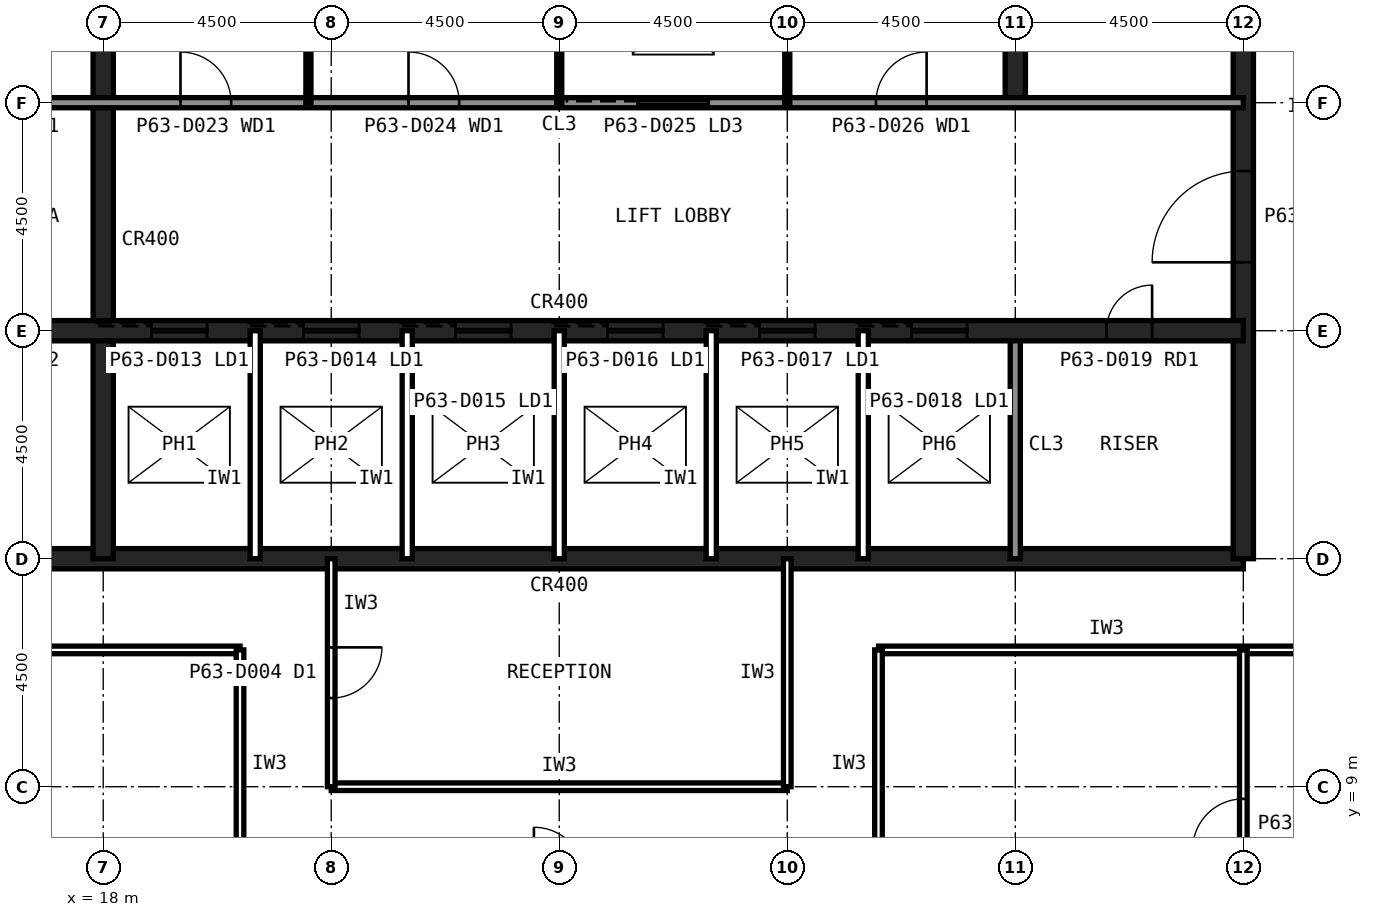
"""IFC4 building model, lengths in metres.
Left out: names, types, materials, properties, quantities, classifications, styles, units other than length and angle.
Written with IfcOpenShell. Run it as: python <this file> out.ifc"""

import sys

from ifc_helpers import new_model, si_unit, direction, frame, frame_2d, origin, place, context, subcontext, project, spatial, rectangle, extrude, element, fill, save


model = new_model("IFC4")
c1 = context("Model", 3, precision=1e-05, world=origin(), true_north=direction((0.0, 1.0)))
c2 = subcontext(c1, "Body", "Model", "MODEL_VIEW")
j1 = project(units=[si_unit("LENGTHUNIT", "METRE"), si_unit("PLANEANGLEUNIT", "RADIAN")], contexts=[c1])
p1 = place(None, origin())
s1 = spatial("IfcSite", under=j1, at=p1, CompositionType="ELEMENT")
p2 = place(p1, origin())
s2 = spatial("IfcBuilding", under=s1, at=p2, CompositionType="ELEMENT")
p3 = place(p2, frame((0.0, 0.0, 262.6)))
s3 = spatial("IfcBuildingStorey", under=s2, at=p3, CompositionType="ELEMENT", Elevation=262.6)
p4 = place(p3, frame((13.5, 13.5, 0.0), z_axis=(0.0, 0.0, 1.0), x_axis=(1.0, 0.0, 0.0)))
e1 = element("IfcWall", 1, at=p4, inside=s3, PredefinedType="SHEAR", context=c2, shape_type="SweptSolid", body=[
    extrude(rectangle(XDim=27.0, YDim=0.4, at=frame_2d((13.5, 0.0))), origin(), (0.0, 0.0, 1.0), 4.0),
])
p5 = place(p3, frame((40.5, 13.5, 0.0), z_axis=(0.0, 0.0, 1.0), x_axis=(0.0, 1.0, 0.0)))
e2 = element("IfcWall", 2, at=p5, inside=s3, PredefinedType="SHEAR", context=c2, shape_type="SweptSolid", body=[
    extrude(rectangle(XDim=27.0, YDim=0.4, at=frame_2d((13.5, 0.0))), origin(), (0.0, 0.0, 1.0), 4.0),
])
p6 = place(p5, frame((5.85, 0.0, 0.0)))
e3 = element("IfcOpeningElement", 3, at=p6, cuts=e2, PredefinedType="OPENING", context=c2, shape_type="SweptSolid", body=[
    extrude(rectangle(XDim=1.8, YDim=2.1, at=frame_2d((0.9, 1.05))), frame((0.0, 0.21, 0.0), z_axis=(0.0, -1.0, 0.0), x_axis=(1.0, 0.0, 0.0)), (0.0, 0.0, 1.0), 0.42),
])
p7 = place(p5, frame((19.65, 0.0, 0.0)))
e4 = element("IfcOpeningElement", 4, at=p7, cuts=e2, PredefinedType="OPENING", context=c2, shape_type="SweptSolid", body=[
    extrude(rectangle(XDim=1.2, YDim=2.1, at=frame_2d((0.6, 1.05))), frame((0.0, 0.21, 0.0), z_axis=(0.0, -1.0, 0.0), x_axis=(1.0, 0.0, 0.0)), (0.0, 0.0, 1.0), 0.42),
])
p8 = place(p3, frame((18.0, 13.5, 0.0), z_axis=(0.0, 0.0, 1.0), x_axis=(0.0, 1.0, 0.0)))
e5 = element("IfcWall", 5, at=p8, inside=s3, PredefinedType="SHEAR", context=c2, shape_type="SweptSolid", body=[
    extrude(rectangle(XDim=18.0, YDim=0.4, at=frame_2d((9.0, 0.0))), origin(), (0.0, 0.0, 1.0), 4.0),
])
p9 = place(p3, frame((36.0, 13.5, 0.0), z_axis=(0.0, 0.0, 1.0), x_axis=(0.0, 1.0, 0.0)))
e6 = element("IfcWall", 6, at=p9, inside=s3, PredefinedType="SOLIDWALL", context=c2, shape_type="SweptSolid", body=[
    extrude(rectangle(XDim=4.5, YDim=0.2, at=frame_2d((2.25, 0.0))), origin(), (0.0, 0.0, 1.0), 3.84),
])
p10 = place(p3, frame((36.0, 22.5, 0.0), z_axis=(0.0, 0.0, 1.0), x_axis=(0.0, 1.0, 0.0)))
e7 = element("IfcWall", 7, at=p10, inside=s3, PredefinedType="SHEAR", context=c2, shape_type="SweptSolid", body=[
    extrude(rectangle(XDim=18.0, YDim=0.4, at=frame_2d((9.0, 0.0))), origin(), (0.0, 0.0, 1.0), 4.0),
])
p11 = place(p3, frame((13.5, 18.0, 0.0), z_axis=(0.0, 0.0, 1.0), x_axis=(1.0, 0.0, 0.0)))
e8 = element("IfcWall", 8, at=p11, inside=s3, PredefinedType="SHEAR", context=c2, shape_type="SweptSolid", body=[
    extrude(rectangle(XDim=27.0, YDim=0.4, at=frame_2d((13.5, 0.0))), origin(), (0.0, 0.0, 1.0), 4.0),
])
p12 = place(p11, frame((24.3, 0.0, 0.0)))
e9 = element("IfcOpeningElement", 9, at=p12, cuts=e8, PredefinedType="OPENING", context=c2, shape_type="SweptSolid", body=[
    extrude(rectangle(XDim=0.9, YDim=2.1, at=frame_2d((0.45, 1.05))), frame((0.0, 0.21, 0.0), z_axis=(0.0, -1.0, 0.0), x_axis=(1.0, 0.0, 0.0)), (0.0, 0.0, 1.0), 0.42),
])
p13 = place(p11, frame((5.45, 0.0, 0.0)))
e10 = element("IfcOpeningElement", 10, at=p13, cuts=e8, PredefinedType="OPENING", context=c2, shape_type="SweptSolid", body=[
    extrude(rectangle(XDim=1.1, YDim=2.1, at=frame_2d((0.55, 1.05))), frame((0.0, 0.21, 0.0), z_axis=(0.0, -1.0, 0.0), x_axis=(1.0, 0.0, 0.0)), (0.0, 0.0, 1.0), 0.42),
])
p14 = place(p11, frame((8.45, 0.0, 0.0)))
e11 = element("IfcOpeningElement", 11, at=p14, cuts=e8, PredefinedType="OPENING", context=c2, shape_type="SweptSolid", body=[
    extrude(rectangle(XDim=1.1, YDim=2.1, at=frame_2d((0.55, 1.05))), frame((0.0, 0.21, 0.0), z_axis=(0.0, -1.0, 0.0), x_axis=(1.0, 0.0, 0.0)), (0.0, 0.0, 1.0), 0.42),
])
p15 = place(p11, frame((11.45, 0.0, 0.0)))
e12 = element("IfcOpeningElement", 12, at=p15, cuts=e8, PredefinedType="OPENING", context=c2, shape_type="SweptSolid", body=[
    extrude(rectangle(XDim=1.1, YDim=2.1, at=frame_2d((0.55, 1.05))), frame((0.0, 0.21, 0.0), z_axis=(0.0, -1.0, 0.0), x_axis=(1.0, 0.0, 0.0)), (0.0, 0.0, 1.0), 0.42),
])
p16 = place(p11, frame((14.45, 0.0, 0.0)))
e13 = element("IfcOpeningElement", 13, at=p16, cuts=e8, PredefinedType="OPENING", context=c2, shape_type="SweptSolid", body=[
    extrude(rectangle(XDim=1.1, YDim=2.1, at=frame_2d((0.55, 1.05))), frame((0.0, 0.21, 0.0), z_axis=(0.0, -1.0, 0.0), x_axis=(1.0, 0.0, 0.0)), (0.0, 0.0, 1.0), 0.42),
])
p17 = place(p11, frame((17.45, 0.0, 0.0)))
e14 = element("IfcOpeningElement", 14, at=p17, cuts=e8, PredefinedType="OPENING", context=c2, shape_type="SweptSolid", body=[
    extrude(rectangle(XDim=1.1, YDim=2.1, at=frame_2d((0.55, 1.05))), frame((0.0, 0.21, 0.0), z_axis=(0.0, -1.0, 0.0), x_axis=(1.0, 0.0, 0.0)), (0.0, 0.0, 1.0), 0.42),
])
p18 = place(p11, frame((20.45, 0.0, 0.0)))
e15 = element("IfcOpeningElement", 15, at=p18, cuts=e8, PredefinedType="OPENING", context=c2, shape_type="SweptSolid", body=[
    extrude(rectangle(XDim=1.1, YDim=2.1, at=frame_2d((0.55, 1.05))), frame((0.0, 0.21, 0.0), z_axis=(0.0, -1.0, 0.0), x_axis=(1.0, 0.0, 0.0)), (0.0, 0.0, 1.0), 0.42),
])
p19 = place(p11, frame((1.6, 0.0, 0.0)))
e16 = element("IfcOpeningElement", 16, at=p19, cuts=e8, PredefinedType="OPENING", context=c2, shape_type="SweptSolid", body=[
    extrude(rectangle(XDim=1.3, YDim=2.2, at=frame_2d((0.65, 1.1))), frame((0.0, 0.21, 0.0), z_axis=(0.0, -1.0, 0.0), x_axis=(1.0, 0.0, 0.0)), (0.0, 0.0, 1.0), 0.42),
])
p20 = place(p3, frame((13.5, 22.5, 0.0), z_axis=(0.0, 0.0, 1.0), x_axis=(1.0, 0.0, 0.0)))
e17 = element("IfcWall", 17, at=p20, inside=s3, PredefinedType="SOLIDWALL", context=c2, shape_type="SweptSolid", body=[
    extrude(rectangle(XDim=27.0, YDim=0.2, at=frame_2d((13.5, 0.0))), origin(), (0.0, 0.0, 1.0), 3.84),
])
p21 = place(p20, frame((1.65, 0.0, 0.0)))
e18 = element("IfcOpeningElement", 18, at=p21, cuts=e17, PredefinedType="OPENING", context=c2, shape_type="SweptSolid", body=[
    extrude(rectangle(XDim=1.2, YDim=2.1, at=frame_2d((0.6, 1.05))), frame((0.0, 0.11, 0.0), z_axis=(0.0, -1.0, 0.0), x_axis=(1.0, 0.0, 0.0)), (0.0, 0.0, 1.0), 0.22),
])
p22 = place(p20, frame((6.025, 0.0, 0.0)))
e19 = element("IfcOpeningElement", 19, at=p22, cuts=e17, PredefinedType="OPENING", context=c2, shape_type="SweptSolid", body=[
    extrude(rectangle(XDim=1.0, YDim=2.1, at=frame_2d((0.5, 1.05))), frame((0.0, 0.11, 0.0), z_axis=(0.0, -1.0, 0.0), x_axis=(1.0, 0.0, 0.0)), (0.0, 0.0, 1.0), 0.22),
])
p23 = place(p20, frame((10.525, 0.0, 0.0)))
e20 = element("IfcOpeningElement", 20, at=p23, cuts=e17, PredefinedType="OPENING", context=c2, shape_type="SweptSolid", body=[
    extrude(rectangle(XDim=1.0, YDim=2.1, at=frame_2d((0.5, 1.05))), frame((0.0, 0.11, 0.0), z_axis=(0.0, -1.0, 0.0), x_axis=(1.0, 0.0, 0.0)), (0.0, 0.0, 1.0), 0.22),
])
p24 = place(p20, frame((19.75, 0.0, 0.0)))
e21 = element("IfcOpeningElement", 21, at=p24, cuts=e17, PredefinedType="OPENING", context=c2, shape_type="SweptSolid", body=[
    extrude(rectangle(XDim=1.0, YDim=2.1, at=frame_2d((0.5, 1.05))), frame((0.0, 0.11, 0.0), z_axis=(0.0, -1.0, 0.0), x_axis=(1.0, 0.0, 0.0)), (0.0, 0.0, 1.0), 0.22),
])
p25 = place(p20, frame((15.05, 0.0, 0.0)))
e22 = element("IfcOpeningElement", 22, at=p25, cuts=e17, PredefinedType="OPENING", context=c2, shape_type="SweptSolid", body=[
    extrude(rectangle(XDim=1.4, YDim=2.4, at=frame_2d((0.7, 1.2))), frame((0.0, 0.11, 0.0), z_axis=(0.0, -1.0, 0.0), x_axis=(1.0, 0.0, 0.0)), (0.0, 0.0, 1.0), 0.22),
])
for number, where, z_axis, x_axis in (
    (23, (21.0, 13.5, 0.0), (0.0, 0.0, 1.0), (0.0, 1.0, 0.0)),
    (24, (24.0, 13.5, 0.0), (0.0, 0.0, 1.0), (0.0, 1.0, 0.0)),
    (25, (27.0, 13.5, 0.0), (0.0, 0.0, 1.0), (0.0, 1.0, 0.0)),
    (26, (30.0, 13.5, 0.0), (0.0, 0.0, 1.0), (0.0, 1.0, 0.0)),
    (27, (33.0, 13.5, 0.0), (0.0, 0.0, 1.0), (0.0, 1.0, 0.0)),
):
    element("IfcWall", number, at=place(p3, frame(where, z_axis=z_axis, x_axis=x_axis)), inside=s3, PredefinedType="PARTITIONING", context=c2, shape_type="SweptSolid", body=[
        extrude(rectangle(XDim=4.5, YDim=0.2, at=frame_2d((2.25, 0.0))), origin(), (0.0, 0.0, 1.0), 3.84),
    ])
for number, where, z_axis, x_axis in (
    (28, (22.05, 22.5, 0.0), (0.0, 0.0, 1.0), (0.0, 1.0, 0.0)),
    (29, (27.0, 22.5, 0.0), (0.0, 0.0, 1.0), (0.0, 1.0, 0.0)),
    (30, (31.5, 22.5, 0.0), (0.0, 0.0, 1.0), (0.0, 1.0, 0.0)),
):
    element("IfcWall", number, at=place(p3, frame(where, z_axis=z_axis, x_axis=x_axis)), inside=s3, PredefinedType="PLUMBINGWALL", context=c2, shape_type="SweptSolid", body=[
        extrude(rectangle(XDim=9.0, YDim=0.1, at=frame_2d((4.5, 0.0))), origin(), (0.0, 0.0, 1.0), 3.84),
    ])
for number, where, z_axis, x_axis in (
    (31, (11.7, 11.7, 0.0), (0.0, 0.0, 1.0), (1.0, 0.0, 0.0)),
    (32, (33.3, 11.7, 0.0), (0.0, 0.0, 1.0), (1.0, 0.0, 0.0)),
):
    element("IfcWall", number, at=place(p3, frame(where, z_axis=z_axis, x_axis=x_axis)), inside=s3, PredefinedType="PARTITIONING", context=c2, shape_type="SweptSolid", body=[
        extrude(rectangle(XDim=9.0, YDim=0.15, at=frame_2d((4.5, 0.0))), origin(), (0.0, 0.0, 1.0), 3.84),
    ])
for number, where, z_axis, x_axis in (
    (33, (20.7, 11.7, 0.0), (0.0, 0.0, 1.0), (0.0, -1.0, 0.0)),
    (34, (33.3, 7.2, 0.0), (0.0, 0.0, 1.0), (0.0, 1.0, 0.0)),
):
    element("IfcWall", number, at=place(p3, frame(where, z_axis=z_axis, x_axis=x_axis)), inside=s3, PredefinedType="PARTITIONING", context=c2, shape_type="SweptSolid", body=[
        extrude(rectangle(XDim=4.5, YDim=0.15, at=frame_2d((2.25, 0.0))), origin(), (0.0, 0.0, 1.0), 3.84),
    ])
p26 = place(p3, frame((22.5, 9.0, 0.0), z_axis=(0.0, 0.0, 1.0), x_axis=(1.0, 0.0, 0.0)))
e35 = element("IfcWall", 35, at=p26, inside=s3, PredefinedType="PARTITIONING", context=c2, shape_type="SweptSolid", body=[
    extrude(rectangle(XDim=9.0, YDim=0.15, at=frame_2d((4.5, 0.0))), origin(), (0.0, 0.0, 1.0), 3.84),
])
p27 = place(p3, frame((31.5, 9.0, 0.0), z_axis=(0.0, 0.0, 1.0), x_axis=(0.0, 1.0, 0.0)))
e36 = element("IfcWall", 36, at=p27, inside=s3, PredefinedType="PARTITIONING", context=c2, shape_type="SweptSolid", body=[
    extrude(rectangle(XDim=4.5, YDim=0.15, at=frame_2d((2.25, 0.0))), origin(), (0.0, 0.0, 1.0), 2.989),
])
p28 = place(p3, frame((22.5, 13.5, 0.0), z_axis=(0.0, 0.0, 1.0), x_axis=(0.0, -1.0, 0.0)))
e37 = element("IfcWall", 37, at=p28, inside=s3, PredefinedType="PARTITIONING", context=c2, shape_type="SweptSolid", body=[
    extrude(rectangle(XDim=4.5, YDim=0.15, at=frame_2d((2.25, 0.0))), origin(), (0.0, 0.0, 1.0), 2.989),
])
p29 = place(p28, frame((1.75, 0.0, 0.0)))
e38 = element("IfcOpeningElement", 38, at=p29, cuts=e37, PredefinedType="OPENING", context=c2, shape_type="SweptSolid", body=[
    extrude(rectangle(XDim=1.0, YDim=2.1, at=frame_2d((0.5, 1.05))), frame((0.0, 0.085, 0.0), z_axis=(0.0, -1.0, 0.0), x_axis=(1.0, 0.0, 0.0)), (0.0, 0.0, 1.0), 0.17),
])
p30 = place(p3, frame((40.5, 4.82, 0.0), z_axis=(0.0, 0.0, 1.0), x_axis=(0.0, 1.0, 0.0)))
e39 = element("IfcWall", 39, at=p30, inside=s3, PredefinedType="PARTITIONING", context=c2, shape_type="SweptSolid", body=[
    extrude(rectangle(XDim=6.88, YDim=0.15, at=frame_2d((3.44, 0.0))), origin(), (0.0, 0.0, 1.0), 2.989),
])
p31 = place(p30, frame((2.94, 0.0, 0.0)))
e40 = element("IfcOpeningElement", 40, at=p31, cuts=e39, PredefinedType="OPENING", context=c2, shape_type="SweptSolid", body=[
    extrude(rectangle(XDim=1.0, YDim=2.1, at=frame_2d((0.5, 1.05))), frame((0.0, 0.085, 0.0), z_axis=(0.0, -1.0, 0.0), x_axis=(1.0, 0.0, 0.0)), (0.0, 0.0, 1.0), 0.17),
])
p32 = place(p6, origin())
e41 = element("IfcDoor", 41, at=p32, inside=s3, OperationType="SINGLE_SWING_LEFT", PredefinedType="DOOR", context=c2, shape_type="SweptSolid", body=[
    extrude(rectangle(XDim=1.8, YDim=2.1, at=frame_2d((0.9, 1.05))), frame((0.0, 0.025, 0.0), z_axis=(0.0, -1.0, 0.0), x_axis=(1.0, 0.0, 0.0)), (0.0, 0.0, 1.0), 0.05),
])
fill(e3, e41)
p33 = place(p22, origin())
e42 = element("IfcDoor", 42, at=p33, inside=s3, OperationType="SINGLE_SWING_LEFT", PredefinedType="DOOR", context=c2, shape_type="SweptSolid", body=[
    extrude(rectangle(XDim=1.0, YDim=2.1, at=frame_2d((0.5, 1.05))), frame((0.0, 0.025, 0.0), z_axis=(0.0, -1.0, 0.0), x_axis=(1.0, 0.0, 0.0)), (0.0, 0.0, 1.0), 0.05),
])
fill(e19, e42)
p34 = place(p23, origin())
e43 = element("IfcDoor", 43, at=p34, inside=s3, OperationType="SINGLE_SWING_LEFT", PredefinedType="DOOR", context=c2, shape_type="SweptSolid", body=[
    extrude(rectangle(XDim=1.0, YDim=2.1, at=frame_2d((0.5, 1.05))), frame((0.0, 0.025, 0.0), z_axis=(0.0, -1.0, 0.0), x_axis=(1.0, 0.0, 0.0)), (0.0, 0.0, 1.0), 0.05),
])
fill(e20, e43)
p35 = place(p24, origin())
e44 = element("IfcDoor", 44, at=p35, inside=s3, OperationType="SINGLE_SWING_RIGHT", PredefinedType="DOOR", context=c2, shape_type="SweptSolid", body=[
    extrude(rectangle(XDim=1.0, YDim=2.1, at=frame_2d((0.5, 1.05))), frame((0.0, 0.025, 0.0), z_axis=(0.0, -1.0, 0.0), x_axis=(1.0, 0.0, 0.0)), (0.0, 0.0, 1.0), 0.05),
])
fill(e21, e44)
p36 = place(p12, origin())
e45 = element("IfcDoor", 45, at=p36, inside=s3, OperationType="SINGLE_SWING_RIGHT", PredefinedType="DOOR", context=c2, shape_type="SweptSolid", body=[
    extrude(rectangle(XDim=0.9, YDim=2.1, at=frame_2d((0.45, 1.05))), frame((0.0, 0.025, 0.0), z_axis=(0.0, -1.0, 0.0), x_axis=(1.0, 0.0, 0.0)), (0.0, 0.0, 1.0), 0.05),
])
fill(e9, e45)
p37 = place(p13, origin())
e46 = element("IfcDoor", 46, at=p37, inside=s3, OperationType="SLIDING_TO_LEFT", PredefinedType="DOOR", context=c2, shape_type="SweptSolid", body=[
    extrude(rectangle(XDim=1.1, YDim=2.1, at=frame_2d((0.55, 1.05))), frame((0.0, 0.025, 0.0), z_axis=(0.0, -1.0, 0.0), x_axis=(1.0, 0.0, 0.0)), (0.0, 0.0, 1.0), 0.05),
])
fill(e10, e46)
p38 = place(p14, origin())
e47 = element("IfcDoor", 47, at=p38, inside=s3, OperationType="SLIDING_TO_LEFT", PredefinedType="DOOR", context=c2, shape_type="SweptSolid", body=[
    extrude(rectangle(XDim=1.1, YDim=2.1, at=frame_2d((0.55, 1.05))), frame((0.0, 0.025, 0.0), z_axis=(0.0, -1.0, 0.0), x_axis=(1.0, 0.0, 0.0)), (0.0, 0.0, 1.0), 0.05),
])
fill(e11, e47)
p39 = place(p15, origin())
e48 = element("IfcDoor", 48, at=p39, inside=s3, OperationType="SLIDING_TO_LEFT", PredefinedType="DOOR", context=c2, shape_type="SweptSolid", body=[
    extrude(rectangle(XDim=1.1, YDim=2.1, at=frame_2d((0.55, 1.05))), frame((0.0, 0.025, 0.0), z_axis=(0.0, -1.0, 0.0), x_axis=(1.0, 0.0, 0.0)), (0.0, 0.0, 1.0), 0.05),
])
fill(e12, e48)
p40 = place(p16, origin())
e49 = element("IfcDoor", 49, at=p40, inside=s3, OperationType="SLIDING_TO_LEFT", PredefinedType="DOOR", context=c2, shape_type="SweptSolid", body=[
    extrude(rectangle(XDim=1.1, YDim=2.1, at=frame_2d((0.55, 1.05))), frame((0.0, 0.025, 0.0), z_axis=(0.0, -1.0, 0.0), x_axis=(1.0, 0.0, 0.0)), (0.0, 0.0, 1.0), 0.05),
])
fill(e13, e49)
p41 = place(p17, origin())
e50 = element("IfcDoor", 50, at=p41, inside=s3, OperationType="SLIDING_TO_LEFT", PredefinedType="DOOR", context=c2, shape_type="SweptSolid", body=[
    extrude(rectangle(XDim=1.1, YDim=2.1, at=frame_2d((0.55, 1.05))), frame((0.0, 0.025, 0.0), z_axis=(0.0, -1.0, 0.0), x_axis=(1.0, 0.0, 0.0)), (0.0, 0.0, 1.0), 0.05),
])
fill(e14, e50)
p42 = place(p18, origin())
e51 = element("IfcDoor", 51, at=p42, inside=s3, OperationType="SLIDING_TO_LEFT", PredefinedType="DOOR", context=c2, shape_type="SweptSolid", body=[
    extrude(rectangle(XDim=1.1, YDim=2.1, at=frame_2d((0.55, 1.05))), frame((0.0, 0.025, 0.0), z_axis=(0.0, -1.0, 0.0), x_axis=(1.0, 0.0, 0.0)), (0.0, 0.0, 1.0), 0.05),
])
fill(e15, e51)
p43 = place(p25, origin())
e52 = element("IfcDoor", 52, at=p43, inside=s3, OperationType="SLIDING_TO_LEFT", PredefinedType="DOOR", context=c2, shape_type="SweptSolid", body=[
    extrude(rectangle(XDim=1.4, YDim=2.4, at=frame_2d((0.7, 1.2))), frame((0.0, 0.025, 0.0), z_axis=(0.0, -1.0, 0.0), x_axis=(1.0, 0.0, 0.0)), (0.0, 0.0, 1.0), 0.05),
])
fill(e22, e52)
p44 = place(p29, origin())
e53 = element("IfcDoor", 53, at=p44, inside=s3, OperationType="SINGLE_SWING_LEFT", PredefinedType="DOOR", context=c2, shape_type="SweptSolid", body=[
    extrude(rectangle(XDim=1.0, YDim=2.1, at=frame_2d((0.5, 1.05))), frame((0.0, 0.025, 0.0), z_axis=(0.0, -1.0, 0.0), x_axis=(1.0, 0.0, 0.0)), (0.0, 0.0, 1.0), 0.05),
])
fill(e38, e53)
p45 = place(p31, origin())
e54 = element("IfcDoor", 54, at=p45, inside=s3, OperationType="SINGLE_SWING_LEFT", PredefinedType="DOOR", context=c2, shape_type="SweptSolid", body=[
    extrude(rectangle(XDim=1.0, YDim=2.1, at=frame_2d((0.5, 1.05))), frame((0.0, 0.025, 0.0), z_axis=(0.0, -1.0, 0.0), x_axis=(1.0, 0.0, 0.0)), (0.0, 0.0, 1.0), 0.05),
])
fill(e40, e54)
save(model, sys.argv[1])
